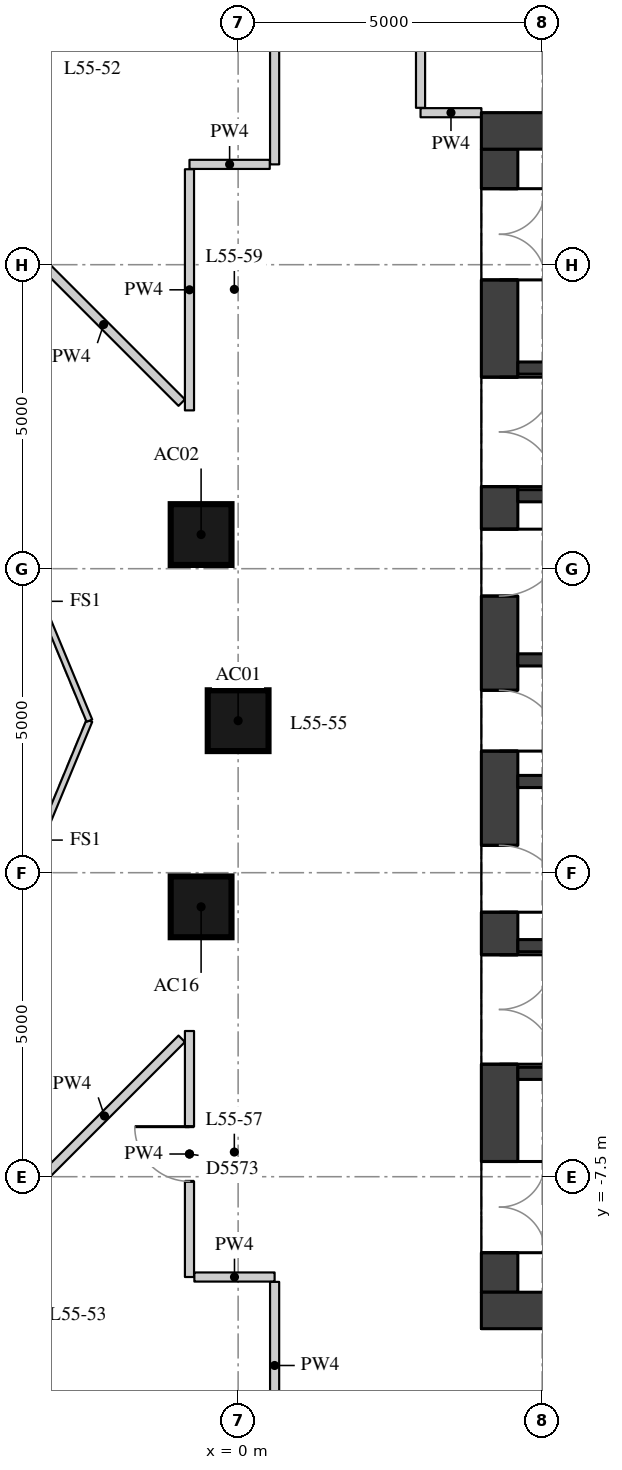
"""IFC4 building model, lengths in metres.
Left out: names, types, materials, properties, quantities, classifications, styles, units other than length and angle.
Written with IfcOpenShell. Run it as: python <this file> out.ifc"""

import sys

from ifc_helpers import new_model, si_unit, direction, frame, frame_2d, origin, origin_2d, place, context, subcontext, project, spatial, rectangle, extrude, element, fill, save


model = new_model("IFC4")
c1 = context("Model", 3, precision=1e-05, world=origin(), true_north=direction((0.0, 1.0)))
c2 = subcontext(c1, "Body", "Model", "MODEL_VIEW")
j1 = project(units=[si_unit("LENGTHUNIT", "METRE"), si_unit("PLANEANGLEUNIT", "RADIAN")], contexts=[c1])
p1 = place(None, origin())
s1 = spatial("IfcSite", under=j1, at=p1, CompositionType="ELEMENT")
p2 = place(p1, origin())
s2 = spatial("IfcBuilding", under=s1, at=p2, CompositionType="ELEMENT")
p3 = place(p2, frame((0.0, 0.0, 195.8)))
s3 = spatial("IfcBuildingStorey", under=s2, at=p3, CompositionType="ELEMENT", Elevation=195.8)
for number, where, z_axis, x_axis in (
    (1, (0.0, 0.0, 0.0), (0.0, 0.0, 1.0), (1.0, 0.0, 0.0)),
    (2, (-0.609, 3.062, 0.0), (0.0, 0.0, 1.0), (1.0, 0.0, 0.0)),
    (3, (-0.609, -3.062, 0.0), (0.0, 0.0, 1.0), (1.0, 0.0, 0.0)),
):
    element("IfcColumn", number, at=place(p3, frame(where, z_axis=z_axis, x_axis=x_axis)), inside=s3, PredefinedType="COLUMN", context=c2, shape_type="SweptSolid", body=[
        extrude(rectangle(XDim=1.0, YDim=1.0, at=origin_2d()), origin(), (0.0, 0.0, 1.0), 3.3),
    ])
p4 = place(p3, frame((4.3, -9.4, 0.0), z_axis=(0.0, 0.0, 1.0), x_axis=(0.0, 1.0, 0.0)))
e4 = element("IfcWall", 4, at=p4, inside=s3, PredefinedType="SHEAR", context=c2, shape_type="SweptSolid", body=[
    extrude(rectangle(XDim=18.8, YDim=0.6, at=frame_2d((9.4, 0.0))), origin(), (0.0, 0.0, 1.0), 3.02),
])
p5 = place(p4, frame((0.65, 0.0, 0.0)))
e5 = element("IfcOpeningElement", 5, at=p5, cuts=e4, PredefinedType="OPENING", context=c2, shape_type="SweptSolid", body=[
    extrude(rectangle(XDim=1.5, YDim=2.1, at=frame_2d((0.75, 1.05))), frame((0.0, 0.31, 0.0), z_axis=(0.0, -1.0, 0.0), x_axis=(1.0, 0.0, 0.0)), (0.0, 0.0, 1.0), 0.62),
])
p6 = place(p4, frame((3.75, 0.0, 0.0)))
e6 = element("IfcOpeningElement", 6, at=p6, cuts=e4, PredefinedType="OPENING", context=c2, shape_type="SweptSolid", body=[
    extrude(rectangle(XDim=1.8, YDim=2.1, at=frame_2d((0.9, 1.05))), frame((0.0, 0.31, 0.0), z_axis=(0.0, -1.0, 0.0), x_axis=(1.0, 0.0, 0.0)), (0.0, 0.0, 1.0), 0.62),
])
p7 = place(p4, frame((6.25, 0.0, 0.0)))
e7 = element("IfcOpeningElement", 7, at=p7, cuts=e4, PredefinedType="OPENING", context=c2, shape_type="SweptSolid", body=[
    extrude(rectangle(XDim=1.1, YDim=2.1, at=frame_2d((0.55, 1.05))), frame((0.0, 0.31, 0.0), z_axis=(0.0, -1.0, 0.0), x_axis=(1.0, 0.0, 0.0)), (0.0, 0.0, 1.0), 0.62),
])
p8 = place(p4, frame((8.9, 0.0, 0.0)))
e8 = element("IfcOpeningElement", 8, at=p8, cuts=e4, PredefinedType="OPENING", context=c2, shape_type="SweptSolid", body=[
    extrude(rectangle(XDim=1.0, YDim=2.1, at=frame_2d((0.5, 1.05))), frame((0.0, 0.31, 0.0), z_axis=(0.0, -1.0, 0.0), x_axis=(1.0, 0.0, 0.0)), (0.0, 0.0, 1.0), 0.62),
])
p9 = place(p4, frame((11.45, 0.0, 0.0)))
e9 = element("IfcOpeningElement", 9, at=p9, cuts=e4, PredefinedType="OPENING", context=c2, shape_type="SweptSolid", body=[
    extrude(rectangle(XDim=1.1, YDim=2.1, at=frame_2d((0.55, 1.05))), frame((0.0, 0.31, 0.0), z_axis=(0.0, -1.0, 0.0), x_axis=(1.0, 0.0, 0.0)), (0.0, 0.0, 1.0), 0.62),
])
p10 = place(p4, frame((13.25, 0.0, 0.0)))
e10 = element("IfcOpeningElement", 10, at=p10, cuts=e4, PredefinedType="OPENING", context=c2, shape_type="SweptSolid", body=[
    extrude(rectangle(XDim=1.8, YDim=2.1, at=frame_2d((0.9, 1.05))), frame((0.0, 0.31, 0.0), z_axis=(0.0, -1.0, 0.0), x_axis=(1.0, 0.0, 0.0)), (0.0, 0.0, 1.0), 0.62),
])
p11 = place(p4, frame((16.65, 0.0, 0.0)))
e11 = element("IfcOpeningElement", 11, at=p11, cuts=e4, PredefinedType="OPENING", context=c2, shape_type="SweptSolid", body=[
    extrude(rectangle(XDim=1.5, YDim=2.1, at=frame_2d((0.75, 1.05))), frame((0.0, 0.31, 0.0), z_axis=(0.0, -1.0, 0.0), x_axis=(1.0, 0.0, 0.0)), (0.0, 0.0, 1.0), 0.62),
])
for number, where, z_axis, x_axis in (
    (12, (4.0, 9.7, 0.0), (0.0, 0.0, 1.0), (1.0, 0.0, 0.0)),
    (13, (4.0, -9.7, 0.0), (0.0, 0.0, 1.0), (1.0, 0.0, 0.0)),
):
    element("IfcWall", number, at=place(p3, frame(where, z_axis=z_axis, x_axis=x_axis)), inside=s3, PredefinedType="SHEAR", context=c2, shape_type="SweptSolid", body=[
        extrude(rectangle(XDim=12.0, YDim=0.6, at=frame_2d((6.0, 0.0))), origin(), (0.0, 0.0, 1.0), 3.02),
    ])
p12 = place(p3, frame((4.6, 5.8, 0.0), z_axis=(0.0, 0.0, 1.0), x_axis=(1.0, 0.0, 0.0)))
e14 = element("IfcWall", 14, at=p12, inside=s3, PredefinedType="SHEAR", context=c2, shape_type="SweptSolid", body=[
    extrude(rectangle(XDim=10.8, YDim=0.2, at=frame_2d((5.4, 0.0))), origin(), (0.0, 0.0, 1.0), 3.02),
])
p13 = place(p12, frame((7.05, 0.0, 0.0)))
e15 = element("IfcOpeningElement", 15, at=p13, cuts=e14, PredefinedType="OPENING", context=c2, shape_type="SweptSolid", body=[
    extrude(rectangle(XDim=1.1, YDim=2.1, at=frame_2d((0.55, 1.05))), frame((0.0, 0.11, 0.0), z_axis=(0.0, -1.0, 0.0), x_axis=(1.0, 0.0, 0.0)), (0.0, 0.0, 1.0), 0.22),
])
p14 = place(p12, frame((9.05, 0.0, 0.0)))
e16 = element("IfcOpeningElement", 16, at=p14, cuts=e14, PredefinedType="OPENING", context=c2, shape_type="SweptSolid", body=[
    extrude(rectangle(XDim=1.1, YDim=2.1, at=frame_2d((0.55, 1.05))), frame((0.0, 0.11, 0.0), z_axis=(0.0, -1.0, 0.0), x_axis=(1.0, 0.0, 0.0)), (0.0, 0.0, 1.0), 0.22),
])
p15 = place(p3, frame((4.6, 3.7, 0.0), z_axis=(0.0, 0.0, 1.0), x_axis=(1.0, 0.0, 0.0)))
e17 = element("IfcWall", 17, at=p15, inside=s3, PredefinedType="SHEAR", context=c2, shape_type="SweptSolid", body=[
    extrude(rectangle(XDim=10.8, YDim=0.2, at=frame_2d((5.4, 0.0))), origin(), (0.0, 0.0, 1.0), 3.02),
])
p16 = place(p15, frame((6.6, 0.0, 0.0)))
e18 = element("IfcOpeningElement", 18, at=p16, cuts=e17, PredefinedType="OPENING", context=c2, shape_type="SweptSolid", body=[
    extrude(rectangle(XDim=1.1, YDim=2.1, at=frame_2d((0.55, 1.05))), frame((0.0, 0.11, 0.0), z_axis=(0.0, -1.0, 0.0), x_axis=(1.0, 0.0, 0.0)), (0.0, 0.0, 1.0), 0.22),
])
p17 = place(p15, frame((8.9, 0.0, 0.0)))
e19 = element("IfcOpeningElement", 19, at=p17, cuts=e17, PredefinedType="OPENING", context=c2, shape_type="SweptSolid", body=[
    extrude(rectangle(XDim=1.1, YDim=2.1, at=frame_2d((0.55, 1.05))), frame((0.0, 0.11, 0.0), z_axis=(0.0, -1.0, 0.0), x_axis=(1.0, 0.0, 0.0)), (0.0, 0.0, 1.0), 0.22),
])
for number, where, z_axis, x_axis in (
    (20, (4.6, 1.0, 0.0), (0.0, 0.0, 1.0), (1.0, 0.0, 0.0)),
    (21, (4.6, -1.0, 0.0), (0.0, 0.0, 1.0), (1.0, 0.0, 0.0)),
):
    element("IfcWall", number, at=place(p3, frame(where, z_axis=z_axis, x_axis=x_axis)), inside=s3, PredefinedType="SHEAR", context=c2, shape_type="SweptSolid", body=[
        extrude(rectangle(XDim=10.8, YDim=0.2, at=frame_2d((5.4, 0.0))), origin(), (0.0, 0.0, 1.0), 3.02),
    ])
p18 = place(p3, frame((4.6, -3.7, 0.0), z_axis=(0.0, 0.0, 1.0), x_axis=(1.0, 0.0, 0.0)))
e22 = element("IfcWall", 22, at=p18, inside=s3, PredefinedType="SHEAR", context=c2, shape_type="SweptSolid", body=[
    extrude(rectangle(XDim=10.8, YDim=0.2, at=frame_2d((5.4, 0.0))), origin(), (0.0, 0.0, 1.0), 3.02),
])
p19 = place(p18, frame((6.6, 0.0, 0.0)))
e23 = element("IfcOpeningElement", 23, at=p19, cuts=e22, PredefinedType="OPENING", context=c2, shape_type="SweptSolid", body=[
    extrude(rectangle(XDim=1.1, YDim=2.1, at=frame_2d((0.55, 1.05))), frame((0.0, 0.11, 0.0), z_axis=(0.0, -1.0, 0.0), x_axis=(1.0, 0.0, 0.0)), (0.0, 0.0, 1.0), 0.22),
])
p20 = place(p18, frame((8.9, 0.0, 0.0)))
e24 = element("IfcOpeningElement", 24, at=p20, cuts=e22, PredefinedType="OPENING", context=c2, shape_type="SweptSolid", body=[
    extrude(rectangle(XDim=1.1, YDim=2.1, at=frame_2d((0.55, 1.05))), frame((0.0, 0.11, 0.0), z_axis=(0.0, -1.0, 0.0), x_axis=(1.0, 0.0, 0.0)), (0.0, 0.0, 1.0), 0.22),
])
p21 = place(p3, frame((4.6, -5.8, 0.0), z_axis=(0.0, 0.0, 1.0), x_axis=(1.0, 0.0, 0.0)))
e25 = element("IfcWall", 25, at=p21, inside=s3, PredefinedType="SHEAR", context=c2, shape_type="SweptSolid", body=[
    extrude(rectangle(XDim=10.8, YDim=0.2, at=frame_2d((5.4, 0.0))), origin(), (0.0, 0.0, 1.0), 3.02),
])
p22 = place(p3, frame((4.001, 10.0, 0.0), z_axis=(0.0, 0.0, 1.0), x_axis=(-1.0, 0.0, 0.0)))
e26 = element("IfcWall", 26, at=p22, inside=s3, PredefinedType="PARTITIONING", context=c2, shape_type="SweptSolid", body=[
    extrude(rectangle(XDim=1.001, YDim=0.15, at=frame_2d((0.5, 0.0))), origin(), (0.0, 0.0, 1.0), 3.02),
])
p23 = place(p3, frame((3.0, 10.08, 0.0), z_axis=(0.0, 0.0, 1.0), x_axis=(0.0, 1.0, 0.0)))
e27 = element("IfcWall", 27, at=p23, inside=s3, PredefinedType="PARTITIONING", context=c2, shape_type="SweptSolid", body=[
    extrude(rectangle(XDim=2.742, YDim=0.15, at=frame_2d((1.371, 0.0))), origin(), (0.0, 0.0, 1.0), 3.02),
])
p24 = place(p3, frame((0.6, 13.7, 0.0), z_axis=(0.0, 0.0, 1.0), x_axis=(0.0, -1.0, 0.0)))
e28 = element("IfcWall", 28, at=p24, inside=s3, PredefinedType="PARTITIONING", context=c2, shape_type="SweptSolid", body=[
    extrude(rectangle(XDim=4.55, YDim=0.15, at=frame_2d((2.275, 0.0))), origin(), (0.0, 0.0, 1.0), 3.02),
])
p25 = place(p3, frame((0.52, 9.15, 0.0), z_axis=(0.0, 0.0, 1.0), x_axis=(-1.0, 0.0, 0.0)))
e29 = element("IfcWall", 29, at=p25, inside=s3, PredefinedType="PARTITIONING", context=c2, shape_type="SweptSolid", body=[
    extrude(rectangle(XDim=1.32, YDim=0.15, at=frame_2d((0.66, 0.0))), origin(), (0.0, 0.0, 1.0), 3.02),
])
p26 = place(p3, frame((-0.8, 9.07, 0.0), z_axis=(0.0, 0.0, 1.0), x_axis=(0.0, -1.0, 0.0)))
e30 = element("IfcWall", 30, at=p26, inside=s3, PredefinedType="PARTITIONING", context=c2, shape_type="SweptSolid", body=[
    extrude(rectangle(XDim=3.966, YDim=0.15, at=frame_2d((1.983, 0.0))), origin(), (0.0, 0.0, 1.0), 3.02),
])
p27 = place(p3, frame((-0.927, 5.231, 0.0), z_axis=(0.0, 0.0, 1.0), x_axis=(-0.707106781187, 0.707106781187, 0.0)))
e31 = element("IfcWall", 31, at=p27, inside=s3, PredefinedType="PARTITIONING", context=c2, shape_type="SweptSolid", body=[
    extrude(rectangle(XDim=3.633, YDim=0.15, at=frame_2d((1.817, 0.0))), origin(), (0.0, 0.0, 1.0), 3.02),
])
p28 = place(p3, frame((-0.8, -5.104, 0.0), z_axis=(0.0, 0.0, 1.0), x_axis=(0.0, -1.0, 0.0)))
e32 = element("IfcWall", 32, at=p28, inside=s3, PredefinedType="PARTITIONING", context=c2, shape_type="SweptSolid", body=[
    extrude(rectangle(XDim=4.046, YDim=0.15, at=frame_2d((2.023, 0.0))), origin(), (0.0, 0.0, 1.0), 3.02),
])
p29 = place(p28, frame((1.573, 0.0, 0.0)))
e33 = element("IfcOpeningElement", 33, at=p29, cuts=e32, PredefinedType="OPENING", context=c2, shape_type="SweptSolid", body=[
    extrude(rectangle(XDim=0.9, YDim=2.1, at=frame_2d((0.45, 1.05))), frame((0.0, 0.085, 0.0), z_axis=(0.0, -1.0, 0.0), x_axis=(1.0, 0.0, 0.0)), (0.0, 0.0, 1.0), 0.17),
])
p30 = place(p3, frame((-0.72, -9.15, 0.0), z_axis=(0.0, 0.0, 1.0), x_axis=(1.0, 0.0, 0.0)))
e34 = element("IfcWall", 34, at=p30, inside=s3, PredefinedType="PARTITIONING", context=c2, shape_type="SweptSolid", body=[
    extrude(rectangle(XDim=1.32, YDim=0.15, at=frame_2d((0.66, 0.0))), origin(), (0.0, 0.0, 1.0), 3.02),
])
p31 = place(p3, frame((0.6, -9.23, 0.0), z_axis=(0.0, 0.0, 1.0), x_axis=(0.0, -1.0, 0.0)))
e35 = element("IfcWall", 35, at=p31, inside=s3, PredefinedType="PARTITIONING", context=c2, shape_type="SweptSolid", body=[
    extrude(rectangle(XDim=2.75, YDim=0.15, at=frame_2d((1.375, 0.0))), origin(), (0.0, 0.0, 1.0), 3.02),
])
p32 = place(p3, frame((-3.468, -7.772, 0.0), z_axis=(0.0, 0.0, 1.0), x_axis=(0.707106781187, 0.707106781187, 0.0)))
e36 = element("IfcWall", 36, at=p32, inside=s3, PredefinedType="PARTITIONING", context=c2, shape_type="SweptSolid", body=[
    extrude(rectangle(XDim=3.593, YDim=0.15, at=frame_2d((1.797, 0.0))), origin(), (0.0, 0.0, 1.0), 3.02),
])
for number, where, z_axis, x_axis in (
    (37, (-2.446, 0.0, 0.0), (0.0, 0.0, 1.0), (-0.383, -0.924, 0.0)),
    (38, (-4.073, 3.927, 0.0), (0.0, 0.0, 1.0), (0.383, -0.924, 0.0)),
):
    element("IfcWall", number, at=place(p3, frame(where, z_axis=z_axis, x_axis=x_axis)), inside=s3, PredefinedType="PARTITIONING", context=c2, shape_type="SweptSolid", body=[
        extrude(rectangle(XDim=4.251, YDim=0.1, at=frame_2d((2.125, 0.0))), origin(), (0.0, 0.0, 1.0), 3.02),
    ])
p33 = place(p5, origin())
e39 = element("IfcDoor", 39, at=p33, inside=s3, OperationType="DOUBLE_DOOR_SINGLE_SWING", PredefinedType="DOOR", context=c2, shape_type="SweptSolid", body=[
    extrude(rectangle(XDim=1.5, YDim=2.1, at=frame_2d((0.75, 1.05))), frame((0.0, 0.025, 0.0), z_axis=(0.0, -1.0, 0.0), x_axis=(1.0, 0.0, 0.0)), (0.0, 0.0, 1.0), 0.05),
])
fill(e5, e39)
p34 = place(p6, origin())
e40 = element("IfcDoor", 40, at=p34, inside=s3, OperationType="DOUBLE_DOOR_SINGLE_SWING", PredefinedType="DOOR", context=c2, shape_type="SweptSolid", body=[
    extrude(rectangle(XDim=1.8, YDim=2.1, at=frame_2d((0.9, 1.05))), frame((0.0, 0.025, 0.0), z_axis=(0.0, -1.0, 0.0), x_axis=(1.0, 0.0, 0.0)), (0.0, 0.0, 1.0), 0.05),
])
fill(e6, e40)
p35 = place(p7, origin())
e41 = element("IfcDoor", 41, at=p35, inside=s3, OperationType="SINGLE_SWING_RIGHT", PredefinedType="DOOR", context=c2, shape_type="SweptSolid", body=[
    extrude(rectangle(XDim=1.1, YDim=2.1, at=frame_2d((0.55, 1.05))), frame((0.0, 0.025, 0.0), z_axis=(0.0, -1.0, 0.0), x_axis=(1.0, 0.0, 0.0)), (0.0, 0.0, 1.0), 0.05),
])
fill(e7, e41)
p36 = place(p8, origin())
e42 = element("IfcDoor", 42, at=p36, inside=s3, OperationType="SINGLE_SWING_RIGHT", PredefinedType="DOOR", context=c2, shape_type="SweptSolid", body=[
    extrude(rectangle(XDim=1.0, YDim=2.1, at=frame_2d((0.5, 1.05))), frame((0.0, 0.025, 0.0), z_axis=(0.0, -1.0, 0.0), x_axis=(1.0, 0.0, 0.0)), (0.0, 0.0, 1.0), 0.05),
])
fill(e8, e42)
p37 = place(p9, origin())
e43 = element("IfcDoor", 43, at=p37, inside=s3, OperationType="SINGLE_SWING_LEFT", PredefinedType="DOOR", context=c2, shape_type="SweptSolid", body=[
    extrude(rectangle(XDim=1.1, YDim=2.1, at=frame_2d((0.55, 1.05))), frame((0.0, 0.025, 0.0), z_axis=(0.0, -1.0, 0.0), x_axis=(1.0, 0.0, 0.0)), (0.0, 0.0, 1.0), 0.05),
])
fill(e9, e43)
p38 = place(p10, origin())
e44 = element("IfcDoor", 44, at=p38, inside=s3, OperationType="DOUBLE_DOOR_SINGLE_SWING", PredefinedType="DOOR", context=c2, shape_type="SweptSolid", body=[
    extrude(rectangle(XDim=1.8, YDim=2.1, at=frame_2d((0.9, 1.05))), frame((0.0, 0.025, 0.0), z_axis=(0.0, -1.0, 0.0), x_axis=(1.0, 0.0, 0.0)), (0.0, 0.0, 1.0), 0.05),
])
fill(e10, e44)
p39 = place(p11, origin())
e45 = element("IfcDoor", 45, at=p39, inside=s3, OperationType="DOUBLE_DOOR_SINGLE_SWING", PredefinedType="DOOR", context=c2, shape_type="SweptSolid", body=[
    extrude(rectangle(XDim=1.5, YDim=2.1, at=frame_2d((0.75, 1.05))), frame((0.0, 0.025, 0.0), z_axis=(0.0, -1.0, 0.0), x_axis=(1.0, 0.0, 0.0)), (0.0, 0.0, 1.0), 0.05),
])
fill(e11, e45)
p40 = place(p29, origin())
e46 = element("IfcDoor", 46, at=p40, inside=s3, OperationType="SINGLE_SWING_RIGHT", PredefinedType="DOOR", context=c2, shape_type="SweptSolid", body=[
    extrude(rectangle(XDim=0.9, YDim=2.1, at=frame_2d((0.45, 1.05))), frame((0.0, 0.025, 0.0), z_axis=(0.0, -1.0, 0.0), x_axis=(1.0, 0.0, 0.0)), (0.0, 0.0, 1.0), 0.05),
])
fill(e33, e46)
save(model, sys.argv[1])
